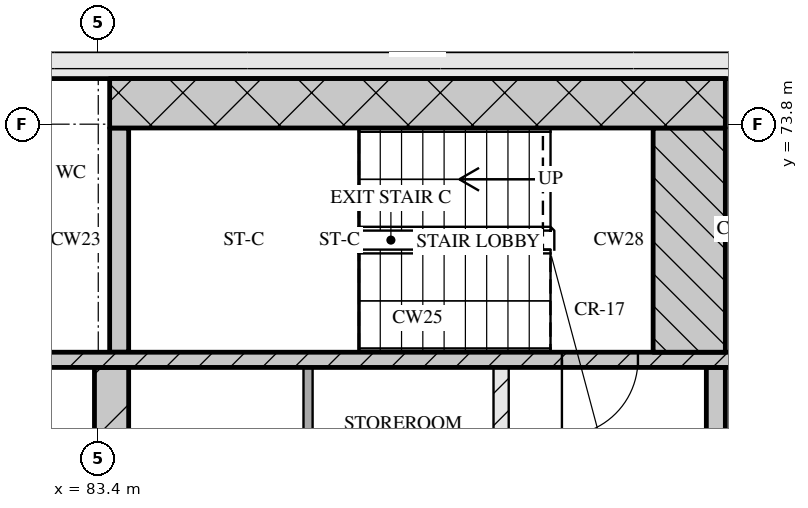
"""IFC4 building model, lengths in metres.
Left out: names, types, materials, properties, quantities, classifications, styles, units other than length and angle.
Written with IfcOpenShell. Run it as: python <this file> out.ifc"""

import sys

from ifc_helpers import new_model, si_unit, direction, frame, frame_2d, origin, place, context, subcontext, project, spatial, rectangle, extrude, element, fill, save


model = new_model("IFC4")
c1 = context("Model", 3, precision=1e-05, world=origin(), true_north=direction((0.0, 1.0)))
c2 = subcontext(c1, "Body", "Model", "MODEL_VIEW")
j1 = project(units=[si_unit("LENGTHUNIT", "METRE"), si_unit("PLANEANGLEUNIT", "RADIAN")], contexts=[c1])
p1 = place(None, origin())
s1 = spatial("IfcSite", under=j1, at=p1, CompositionType="ELEMENT")
p2 = place(p1, origin())
s2 = spatial("IfcBuilding", under=s1, at=p2, CompositionType="ELEMENT")
p3 = place(p2, frame((0.0, 0.0, 306.75)))
s3 = spatial("IfcBuildingStorey", under=s2, at=p3, CompositionType="ELEMENT", Elevation=306.75)
p4 = place(p3, frame((67.3, 74.65, 0.0), z_axis=(0.0, 0.0, 1.0), x_axis=(1.0, 0.0, 0.0)))
e1 = element("IfcWall", 1, at=p4, inside=s3, PredefinedType="SOLIDWALL", context=c2, shape_type="SweptSolid", body=[
    extrude(rectangle(XDim=40.6, YDim=0.5, at=frame_2d((20.3, 0.0))), origin(), (0.0, 0.0, 1.0), 3.3),
])
p5 = place(p3, frame((83.575, 68.0, 0.0), z_axis=(0.0, 0.0, 1.0), x_axis=(0.0, 1.0, 0.0)))
e2 = element("IfcWall", 2, at=p5, inside=s3, PredefinedType="SOLIDWALL", context=c2, shape_type="SweptSolid", body=[
    extrude(rectangle(XDim=2.6, YDim=0.45, at=frame_2d((1.3, 0.0))), origin(), (0.0, 0.0, 1.0), 3.3),
])
p6 = place(p3, frame((86.16, 68.0, 0.0), z_axis=(0.0, 0.0, 1.0), x_axis=(0.0, 1.0, 0.0)))
e3 = element("IfcWall", 3, at=p6, inside=s3, PredefinedType="PARTITIONING", context=c2, shape_type="SweptSolid", body=[
    extrude(rectangle(XDim=2.6, YDim=0.12, at=frame_2d((1.3, 0.0))), origin(), (0.0, 0.0, 1.0), 3.3),
])
p7 = place(p3, frame((88.7, 68.0, 0.0), z_axis=(0.0, 0.0, 1.0), x_axis=(0.0, 1.0, 0.0)))
e4 = element("IfcWall", 4, at=p7, inside=s3, PredefinedType="PARTITIONING", context=c2, shape_type="SweptSolid", body=[
    extrude(rectangle(XDim=2.6, YDim=0.2, at=frame_2d((1.3, 0.0))), origin(), (0.0, 0.0, 1.0), 3.3),
])
p8 = place(p3, frame((91.525, 68.0, 0.0), z_axis=(0.0, 0.0, 1.0), x_axis=(0.0, 1.0, 0.0)))
e5 = element("IfcWall", 5, at=p8, inside=s3, PredefinedType="SOLIDWALL", context=c2, shape_type="SweptSolid", body=[
    extrude(rectangle(XDim=2.6, YDim=0.25, at=frame_2d((1.3, 0.0))), origin(), (0.0, 0.0, 1.0), 3.3),
])
p9 = place(p3, frame((67.8, 70.7, 0.0), z_axis=(0.0, 0.0, 1.0), x_axis=(1.0, 0.0, 0.0)))
e6 = element("IfcWall", 6, at=p9, inside=s3, PredefinedType="SOLIDWALL", context=c2, shape_type="SweptSolid", body=[
    extrude(rectangle(XDim=39.6, YDim=0.2, at=frame_2d((19.8, 0.0))), origin(), (0.0, 0.0, 1.0), 3.3),
])
p10 = place(p9, frame((0.65, 0.0, 0.0)))
e7 = element("IfcOpeningElement", 7, at=p10, cuts=e6, PredefinedType="OPENING", context=c2, shape_type="SweptSolid", body=[
    extrude(rectangle(XDim=1.1, YDim=2.1, at=frame_2d((0.55, 1.05))), frame((0.0, 0.11, 0.0), z_axis=(0.0, -1.0, 0.0), x_axis=(1.0, 0.0, 0.0)), (0.0, 0.0, 1.0), 0.22),
])
p11 = place(p9, frame((3.25, 0.0, 0.0)))
e8 = element("IfcOpeningElement", 8, at=p11, cuts=e6, PredefinedType="OPENING", context=c2, shape_type="SweptSolid", body=[
    extrude(rectangle(XDim=1.1, YDim=2.1, at=frame_2d((0.55, 1.05))), frame((0.0, 0.11, 0.0), z_axis=(0.0, -1.0, 0.0), x_axis=(1.0, 0.0, 0.0)), (0.0, 0.0, 1.0), 0.22),
])
p12 = place(p9, frame((5.9, 0.0, 0.0)))
e9 = element("IfcOpeningElement", 9, at=p12, cuts=e6, PredefinedType="OPENING", context=c2, shape_type="SweptSolid", body=[
    extrude(rectangle(XDim=1.0, YDim=2.1, at=frame_2d((0.5, 1.05))), frame((0.0, 0.11, 0.0), z_axis=(0.0, -1.0, 0.0), x_axis=(1.0, 0.0, 0.0)), (0.0, 0.0, 1.0), 0.22),
])
p13 = place(p9, frame((21.7, 0.0, 0.0)))
e10 = element("IfcOpeningElement", 10, at=p13, cuts=e6, PredefinedType="OPENING", context=c2, shape_type="SweptSolid", body=[
    extrude(rectangle(XDim=1.0, YDim=2.1, at=frame_2d((0.5, 1.05))), frame((0.0, 0.11, 0.0), z_axis=(0.0, -1.0, 0.0), x_axis=(1.0, 0.0, 0.0)), (0.0, 0.0, 1.0), 0.22),
])
p14 = place(p9, frame((32.7, 0.0, 0.0)))
e11 = element("IfcOpeningElement", 11, at=p14, cuts=e6, PredefinedType="OPENING", context=c2, shape_type="SweptSolid", body=[
    extrude(rectangle(XDim=1.0, YDim=2.1, at=frame_2d((0.5, 1.05))), frame((0.0, 0.11, 0.0), z_axis=(0.0, -1.0, 0.0), x_axis=(1.0, 0.0, 0.0)), (0.0, 0.0, 1.0), 0.22),
])
p15 = place(p9, frame((35.25, 0.0, 0.0)))
e12 = element("IfcOpeningElement", 12, at=p15, cuts=e6, PredefinedType="OPENING", context=c2, shape_type="SweptSolid", body=[
    extrude(rectangle(XDim=1.1, YDim=2.1, at=frame_2d((0.55, 1.05))), frame((0.0, 0.11, 0.0), z_axis=(0.0, -1.0, 0.0), x_axis=(1.0, 0.0, 0.0)), (0.0, 0.0, 1.0), 0.22),
])
p16 = place(p9, frame((37.85, 0.0, 0.0)))
e13 = element("IfcOpeningElement", 13, at=p16, cuts=e6, PredefinedType="OPENING", context=c2, shape_type="SweptSolid", body=[
    extrude(rectangle(XDim=1.1, YDim=2.1, at=frame_2d((0.55, 1.05))), frame((0.0, 0.11, 0.0), z_axis=(0.0, -1.0, 0.0), x_axis=(1.0, 0.0, 0.0)), (0.0, 0.0, 1.0), 0.22),
])
p17 = place(p3, frame((83.675, 70.8, 0.0), z_axis=(0.0, 0.0, 1.0), x_axis=(0.0, 1.0, 0.0)))
e14 = element("IfcWall", 14, at=p17, inside=s3, PredefinedType="SOLIDWALL", context=c2, shape_type="SweptSolid", body=[
    extrude(rectangle(XDim=2.95, YDim=0.25, at=frame_2d((1.475, 0.0))), origin(), (0.0, 0.0, 1.0), 3.3),
])
p18 = place(p3, frame((91.175, 70.8, 0.0), z_axis=(0.0, 0.0, 1.0), x_axis=(0.0, 1.0, 0.0)))
e15 = element("IfcWall", 15, at=p18, inside=s3, PredefinedType="SOLIDWALL", context=c2, shape_type="SweptSolid", body=[
    extrude(rectangle(XDim=2.95, YDim=0.95, at=frame_2d((1.475, 0.0))), origin(), (0.0, 0.0, 1.0), 3.3),
])
p19 = place(p3, frame((83.55, 74.075, 0.0), z_axis=(0.0, 0.0, 1.0), x_axis=(1.0, 0.0, 0.0)))
e16 = element("IfcWall", 16, at=p19, inside=s3, PredefinedType="SOLIDWALL", context=c2, shape_type="SweptSolid", body=[
    extrude(rectangle(XDim=8.1, YDim=0.65, at=frame_2d((4.05, 0.0))), origin(), (0.0, 0.0, 1.0), 3.3),
])
p20 = place(p13, origin())
e17 = element("IfcDoor", 17, at=p20, inside=s3, OperationType="SINGLE_SWING_RIGHT", PredefinedType="DOOR", context=c2, shape_type="SweptSolid", body=[
    extrude(rectangle(XDim=1.0, YDim=2.1, at=frame_2d((0.5, 1.05))), frame((0.0, 0.025, 0.0), z_axis=(0.0, -1.0, 0.0), x_axis=(1.0, 0.0, 0.0)), (0.0, 0.0, 1.0), 0.05),
])
fill(e10, e17)
save(model, sys.argv[1])
